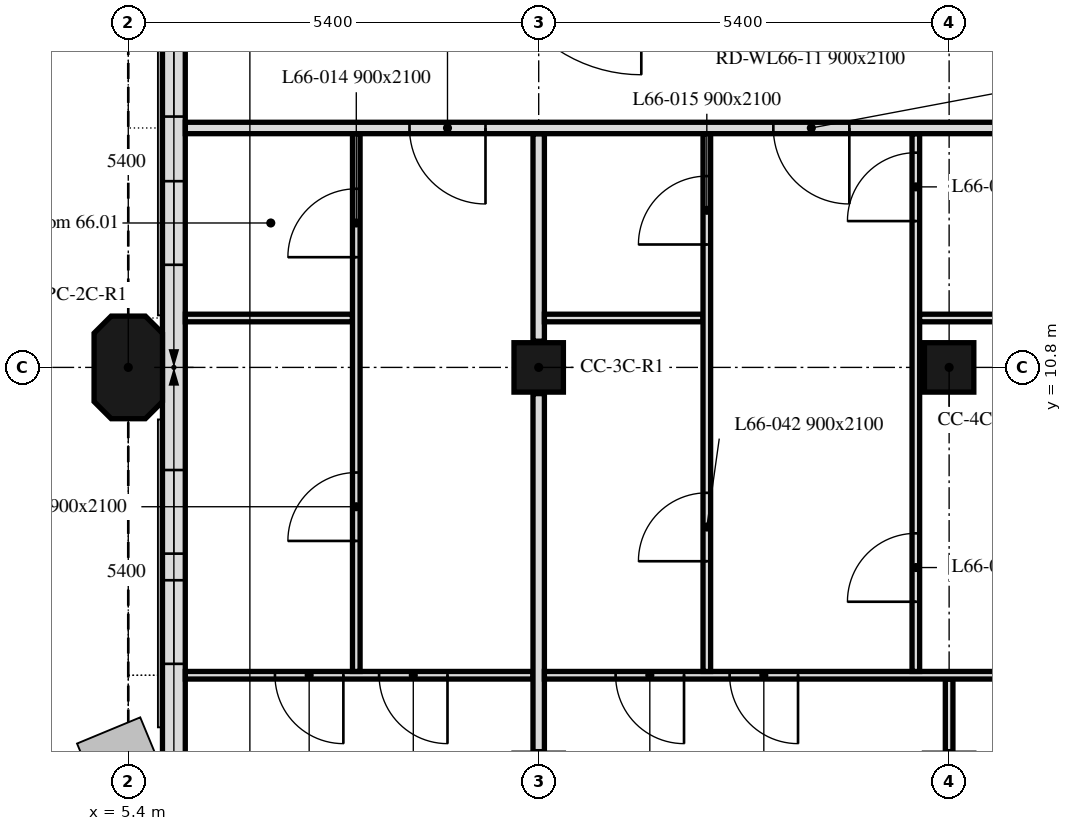
"""IFC4 building model, lengths in metres.
Left out: names, types, materials, properties, quantities, classifications, styles, units other than length and angle.
Written with IfcOpenShell. Run it as: python <this file> out.ifc"""

import sys

from ifc_helpers import new_model, si_unit, direction, frame, frame_2d, origin, origin_2d, place, context, subcontext, project, spatial, polyline, rectangle, outline, extrude, element, fill, save


model = new_model("IFC4")
c1 = context("Model", 3, precision=1e-05, world=origin(), true_north=direction((0.0, 1.0)))
c2 = subcontext(c1, "Body", "Model", "MODEL_VIEW")
j1 = project(units=[si_unit("LENGTHUNIT", "METRE"), si_unit("PLANEANGLEUNIT", "RADIAN")], contexts=[c1])
p1 = place(None, origin())
s1 = spatial("IfcSite", under=j1, at=p1, CompositionType="ELEMENT")
p2 = place(p1, origin())
s2 = spatial("IfcBuilding", under=s1, at=p2, CompositionType="ELEMENT")
p3 = place(p2, frame((0.0, 0.0, 271.9)))
s3 = spatial("IfcBuildingStorey", under=s2, at=p3, CompositionType="ELEMENT", Elevation=271.9)
p4 = place(p3, frame((5.4, 10.8, 0.0), z_axis=(0.0, 0.0, 1.0), x_axis=(0.0, 1.0, 0.0)))
e1 = element("IfcColumn", 1, at=p4, inside=s3, PredefinedType="COLUMN", context=c2, shape_type="SweptSolid", body=[
    extrude(outline(polyline([(-0.45, -0.45), (0.45, -0.45), (0.675, -0.225), (0.675, 0.225), (0.45, 0.45), (-0.45, 0.45), (-0.675, 0.225), (-0.675, -0.225), (-0.45, -0.45)])), origin(), (0.0, 0.0, 1.0), 3.0),
])
for number, where, z_axis, x_axis in (
    (2, (10.8, 10.8, 0.0), (0.0, 0.0, 1.0), (1.0, 0.0, 0.0)),
    (3, (16.2, 10.8, 0.0), (0.0, 0.0, 1.0), (1.0, 0.0, 0.0)),
):
    element("IfcColumn", number, at=place(p3, frame(where, z_axis=z_axis, x_axis=x_axis)), inside=s3, PredefinedType="COLUMN", context=c2, shape_type="SweptSolid", body=[
        extrude(rectangle(XDim=0.65, YDim=0.65, at=origin_2d()), origin(), (0.0, 0.0, 1.0), 3.0),
    ])
p5 = place(p3, frame((6.0, 16.2, 0.0), z_axis=(0.0, 0.0, 1.0), x_axis=(0.0, -1.0, 0.0)))
e4 = element("IfcWall", 4, at=p5, inside=s3, PredefinedType="SOLIDWALL", context=c2, shape_type="SweptSolid", body=[
    extrude(rectangle(XDim=10.614, YDim=0.3, at=frame_2d((5.307, 0.0))), origin(), (0.0, 0.0, 1.0), 3.0),
])
p6 = place(p5, frame((1.0, 0.0, 0.9)))
e5 = element("IfcOpeningElement", 5, at=p6, cuts=e4, PredefinedType="OPENING", context=c2, shape_type="SweptSolid", body=[
    extrude(rectangle(XDim=1.1, YDim=1.7, at=frame_2d((0.55, 0.85))), frame((0.0, 0.16, 0.0), z_axis=(0.0, -1.0, 0.0), x_axis=(1.0, 0.0, 0.0)), (0.0, 0.0, 1.0), 0.32),
])
p7 = place(p5, frame((2.95, 0.0, 0.9)))
e6 = element("IfcOpeningElement", 6, at=p7, cuts=e4, PredefinedType="OPENING", context=c2, shape_type="SweptSolid", body=[
    extrude(rectangle(XDim=1.1, YDim=1.7, at=frame_2d((0.55, 0.85))), frame((0.0, 0.16, 0.0), z_axis=(0.0, -1.0, 0.0), x_axis=(1.0, 0.0, 0.0)), (0.0, 0.0, 1.0), 0.32),
])
p8 = place(p5, frame((6.75, 0.0, 0.9)))
e7 = element("IfcOpeningElement", 7, at=p8, cuts=e4, PredefinedType="OPENING", context=c2, shape_type="SweptSolid", body=[
    extrude(rectangle(XDim=1.1, YDim=1.7, at=frame_2d((0.55, 0.85))), frame((0.0, 0.16, 0.0), z_axis=(0.0, -1.0, 0.0), x_axis=(1.0, 0.0, 0.0)), (0.0, 0.0, 1.0), 0.32),
])
p9 = place(p5, frame((8.2, 0.0, 0.9)))
e8 = element("IfcOpeningElement", 8, at=p9, cuts=e4, PredefinedType="OPENING", context=c2, shape_type="SweptSolid", body=[
    extrude(rectangle(XDim=1.1, YDim=1.7, at=frame_2d((0.55, 0.85))), frame((0.0, 0.16, 0.0), z_axis=(0.0, -1.0, 0.0), x_axis=(1.0, 0.0, 0.0)), (0.0, 0.0, 1.0), 0.32),
])
p10 = place(p3, frame((10.725, 6.75, 0.0), z_axis=(0.0, 0.0, 1.0), x_axis=(-1.0, 0.0, 0.0)))
e9 = element("IfcWall", 9, at=p10, inside=s3, PredefinedType="PARTITIONING", context=c2, shape_type="SweptSolid", body=[
    extrude(rectangle(XDim=4.574, YDim=0.1, at=frame_2d((2.287, 0.0))), origin(), (0.0, 0.0, 1.0), 3.0),
])
p11 = place(p10, frame((2.495, 0.0, 0.0)))
e10 = element("IfcOpeningElement", 10, at=p11, cuts=e9, PredefinedType="OPENING", context=c2, shape_type="SweptSolid", body=[
    extrude(rectangle(XDim=0.9, YDim=2.1, at=frame_2d((0.45, 1.05))), frame((0.0, 0.05, 0.0), z_axis=(0.0, -1.0, 0.0), x_axis=(1.0, 0.0, 0.0)), (0.0, 0.0, 1.0), 0.1),
])
p12 = place(p10, frame((1.125, 0.0, 0.0)))
e11 = element("IfcOpeningElement", 11, at=p12, cuts=e9, PredefinedType="OPENING", context=c2, shape_type="SweptSolid", body=[
    extrude(rectangle(XDim=0.9, YDim=2.1, at=frame_2d((0.45, 1.05))), frame((0.0, 0.05, 0.0), z_axis=(0.0, -1.0, 0.0), x_axis=(1.0, 0.0, 0.0)), (0.0, 0.0, 1.0), 0.1),
])
p13 = place(p3, frame((8.35, 11.45, 0.0), z_axis=(0.0, 0.0, 1.0), x_axis=(-1.0, 0.0, 0.0)))
e12 = element("IfcWall", 12, at=p13, inside=s3, PredefinedType="PARTITIONING", context=c2, shape_type="SweptSolid", body=[
    extrude(rectangle(XDim=2.199, YDim=0.1, at=frame_2d((1.1, 0.0))), origin(), (0.0, 0.0, 1.0), 3.0),
])
p14 = place(p3, frame((8.4, 6.8, 0.0), z_axis=(0.0, 0.0, 1.0), x_axis=(0.0, 1.0, 0.0)))
e13 = element("IfcWall", 13, at=p14, inside=s3, PredefinedType="PARTITIONING", context=c2, shape_type="SweptSolid", body=[
    extrude(rectangle(XDim=7.075, YDim=0.1, at=frame_2d((3.538, 0.0))), origin(), (0.0, 0.0, 1.0), 3.0),
])
p15 = place(p14, frame((5.45, 0.0, 0.0)))
e14 = element("IfcOpeningElement", 14, at=p15, cuts=e13, PredefinedType="OPENING", context=c2, shape_type="SweptSolid", body=[
    extrude(rectangle(XDim=0.9, YDim=2.1, at=frame_2d((0.45, 1.05))), frame((0.0, 0.05, 0.0), z_axis=(0.0, -1.0, 0.0), x_axis=(1.0, 0.0, 0.0)), (0.0, 0.0, 1.0), 0.1),
])
p16 = place(p14, frame((1.717, 0.0, 0.0)))
e15 = element("IfcOpeningElement", 15, at=p16, cuts=e13, PredefinedType="OPENING", context=c2, shape_type="SweptSolid", body=[
    extrude(rectangle(XDim=0.9, YDim=2.1, at=frame_2d((0.45, 1.05))), frame((0.0, 0.05, 0.0), z_axis=(0.0, -1.0, 0.0), x_axis=(1.0, 0.0, 0.0)), (0.0, 0.0, 1.0), 0.1),
])
p17 = place(p3, frame((10.8, 5.745, 0.0), z_axis=(0.0, 0.0, 1.0), x_axis=(0.0, 1.0, 0.0)))
e16 = element("IfcWall", 16, at=p17, inside=s3, PredefinedType="PARTITIONING", context=c2, shape_type="SweptSolid", body=[
    extrude(rectangle(XDim=4.71, YDim=0.15, at=frame_2d((2.355, 0.0))), origin(), (0.0, 0.0, 1.0), 3.0),
])
p18 = place(p3, frame((10.8, 11.145, 0.0), z_axis=(0.0, 0.0, 1.0), x_axis=(0.0, 1.0, 0.0)))
e17 = element("IfcWall", 17, at=p18, inside=s3, PredefinedType="PARTITIONING", context=c2, shape_type="SweptSolid", body=[
    extrude(rectangle(XDim=2.73, YDim=0.15, at=frame_2d((1.365, 0.0))), origin(), (0.0, 0.0, 1.0), 3.0),
])
p19 = place(p3, frame((16.2, 5.745, 0.0), z_axis=(0.0, 0.0, 1.0), x_axis=(0.0, 1.0, 0.0)))
e18 = element("IfcWall", 18, at=p19, inside=s3, PredefinedType="PARTITIONING", context=c2, shape_type="SweptSolid", body=[
    extrude(rectangle(XDim=0.955, YDim=0.1, at=frame_2d((0.478, 0.0))), origin(), (0.0, 0.0, 1.0), 2.4),
])
p20 = place(p3, frame((21.525, 6.75, 0.0), z_axis=(0.0, 0.0, 1.0), x_axis=(-1.0, 0.0, 0.0)))
e19 = element("IfcWall", 19, at=p20, inside=s3, PredefinedType="PARTITIONING", context=c2, shape_type="SweptSolid", body=[
    extrude(rectangle(XDim=10.65, YDim=0.1, at=frame_2d((5.325, 0.0))), origin(), (0.0, 0.0, 1.0), 2.4),
])
p21 = place(p20, frame((8.813, 0.0, 0.0)))
e20 = element("IfcOpeningElement", 20, at=p21, cuts=e19, PredefinedType="OPENING", context=c2, shape_type="SweptSolid", body=[
    extrude(rectangle(XDim=0.9, YDim=2.1, at=frame_2d((0.45, 1.05))), frame((0.0, 0.05, 0.0), z_axis=(0.0, -1.0, 0.0), x_axis=(1.0, 0.0, 0.0)), (0.0, 0.0, 1.0), 0.1),
])
p22 = place(p20, frame((1.675, 0.0, 0.0)))
e21 = element("IfcOpeningElement", 21, at=p22, cuts=e19, PredefinedType="OPENING", context=c2, shape_type="SweptSolid", body=[
    extrude(rectangle(XDim=0.9, YDim=2.1, at=frame_2d((0.45, 1.05))), frame((0.0, 0.05, 0.0), z_axis=(0.0, -1.0, 0.0), x_axis=(1.0, 0.0, 0.0)), (0.0, 0.0, 1.0), 0.1),
])
p23 = place(p20, frame((7.313, 0.0, 0.0)))
e22 = element("IfcOpeningElement", 22, at=p23, cuts=e19, PredefinedType="OPENING", context=c2, shape_type="SweptSolid", body=[
    extrude(rectangle(XDim=0.9, YDim=2.1, at=frame_2d((0.45, 1.05))), frame((0.0, 0.05, 0.0), z_axis=(0.0, -1.0, 0.0), x_axis=(1.0, 0.0, 0.0)), (0.0, 0.0, 1.0), 0.1),
])
p24 = place(p3, frame((12.962, 11.45, 0.0), z_axis=(0.0, 0.0, 1.0), x_axis=(-1.0, 0.0, 0.0)))
e23 = element("IfcWall", 23, at=p24, inside=s3, PredefinedType="PARTITIONING", context=c2, shape_type="SweptSolid", body=[
    extrude(rectangle(XDim=2.087, YDim=0.1, at=frame_2d((1.043, 0.0))), origin(), (0.0, 0.0, 1.0), 3.0),
])
p25 = place(p3, frame((13.012, 6.8, 0.0), z_axis=(0.0, 0.0, 1.0), x_axis=(0.0, 1.0, 0.0)))
e24 = element("IfcWall", 24, at=p25, inside=s3, PredefinedType="PARTITIONING", context=c2, shape_type="SweptSolid", body=[
    extrude(rectangle(XDim=7.075, YDim=0.1, at=frame_2d((3.538, 0.0))), origin(), (0.0, 0.0, 1.0), 3.0),
])
p26 = place(p25, frame((5.617, 0.0, 0.0)))
e25 = element("IfcOpeningElement", 25, at=p26, cuts=e24, PredefinedType="OPENING", context=c2, shape_type="SweptSolid", body=[
    extrude(rectangle(XDim=0.9, YDim=2.1, at=frame_2d((0.45, 1.05))), frame((0.0, 0.05, 0.0), z_axis=(0.0, -1.0, 0.0), x_axis=(1.0, 0.0, 0.0)), (0.0, 0.0, 1.0), 0.1),
])
p27 = place(p25, frame((1.45, 0.0, 0.0)))
e26 = element("IfcOpeningElement", 26, at=p27, cuts=e24, PredefinedType="OPENING", context=c2, shape_type="SweptSolid", body=[
    extrude(rectangle(XDim=0.9, YDim=2.1, at=frame_2d((0.45, 1.05))), frame((0.0, 0.05, 0.0), z_axis=(0.0, -1.0, 0.0), x_axis=(1.0, 0.0, 0.0)), (0.0, 0.0, 1.0), 0.1),
])
p28 = place(p3, frame((15.762, 6.8, 0.0), z_axis=(0.0, 0.0, 1.0), x_axis=(0.0, 1.0, 0.0)))
e27 = element("IfcWall", 27, at=p28, inside=s3, PredefinedType="PARTITIONING", context=c2, shape_type="SweptSolid", body=[
    extrude(rectangle(XDim=7.075, YDim=0.1, at=frame_2d((3.538, 0.0))), origin(), (0.0, 0.0, 1.0), 3.0),
])
p29 = place(p28, frame((0.917, 0.0, 0.0)))
e28 = element("IfcOpeningElement", 28, at=p29, cuts=e27, PredefinedType="OPENING", context=c2, shape_type="SweptSolid", body=[
    extrude(rectangle(XDim=0.9, YDim=2.1, at=frame_2d((0.45, 1.05))), frame((0.0, 0.05, 0.0), z_axis=(0.0, -1.0, 0.0), x_axis=(1.0, 0.0, 0.0)), (0.0, 0.0, 1.0), 0.1),
])
p30 = place(p28, frame((5.925, 0.0, 0.0)))
e29 = element("IfcOpeningElement", 29, at=p30, cuts=e27, PredefinedType="OPENING", context=c2, shape_type="SweptSolid", body=[
    extrude(rectangle(XDim=0.9, YDim=2.1, at=frame_2d((0.45, 1.05))), frame((0.0, 0.05, 0.0), z_axis=(0.0, -1.0, 0.0), x_axis=(1.0, 0.0, 0.0)), (0.0, 0.0, 1.0), 0.1),
])
p31 = place(p3, frame((18.6, 11.45, 0.0), z_axis=(0.0, 0.0, 1.0), x_axis=(-1.0, 0.0, 0.0)))
e30 = element("IfcWall", 30, at=p31, inside=s3, PredefinedType="PARTITIONING", context=c2, shape_type="SweptSolid", body=[
    extrude(rectangle(XDim=2.788, YDim=0.1, at=frame_2d((1.394, 0.0))), origin(), (0.0, 0.0, 1.0), 2.4),
])
p32 = place(p3, frame((47.849, 13.95, 0.0), z_axis=(0.0, 0.0, 1.0), x_axis=(-1.0, 0.0, 0.0)))
e31 = element("IfcWall", 31, at=p32, inside=s3, PredefinedType="PARTITIONING", context=c2, shape_type="SweptSolid", body=[
    extrude(rectangle(XDim=41.698, YDim=0.15, at=frame_2d((20.849, 0.0))), origin(), (0.0, 0.0, 1.0), 2.4),
])
p33 = place(p32, frame((37.749, 0.0, 0.0)))
e32 = element("IfcOpeningElement", 32, at=p33, cuts=e31, PredefinedType="OPENING", context=c2, shape_type="SweptSolid", body=[
    extrude(rectangle(XDim=1.0, YDim=2.1, at=frame_2d((0.5, 1.05))), frame((0.0, 0.075, 0.0), z_axis=(0.0, -1.0, 0.0), x_axis=(1.0, 0.0, 0.0)), (0.0, 0.0, 1.0), 0.15),
])
p34 = place(p32, frame((32.962, 0.0, 0.0)))
e33 = element("IfcOpeningElement", 33, at=p34, cuts=e31, PredefinedType="OPENING", context=c2, shape_type="SweptSolid", body=[
    extrude(rectangle(XDim=1.0, YDim=2.1, at=frame_2d((0.5, 1.05))), frame((0.0, 0.075, 0.0), z_axis=(0.0, -1.0, 0.0), x_axis=(1.0, 0.0, 0.0)), (0.0, 0.0, 1.0), 0.15),
])
p35 = place(p32, frame((22.179, 0.0, 0.0)))
e34 = element("IfcOpeningElement", 34, at=p35, cuts=e31, PredefinedType="OPENING", context=c2, shape_type="SweptSolid", body=[
    extrude(rectangle(XDim=1.0, YDim=2.1, at=frame_2d((0.5, 1.05))), frame((0.0, 0.075, 0.0), z_axis=(0.0, -1.0, 0.0), x_axis=(1.0, 0.0, 0.0)), (0.0, 0.0, 1.0), 0.15),
])
p36 = place(p32, frame((9.193, 0.0, 0.0)))
e35 = element("IfcOpeningElement", 35, at=p36, cuts=e31, PredefinedType="OPENING", context=c2, shape_type="SweptSolid", body=[
    extrude(rectangle(XDim=1.0, YDim=2.1, at=frame_2d((0.5, 1.05))), frame((0.0, 0.075, 0.0), z_axis=(0.0, -1.0, 0.0), x_axis=(1.0, 0.0, 0.0)), (0.0, 0.0, 1.0), 0.15),
])
p37 = place(p6, origin())
e36 = element("IfcWindow", 36, at=p37, inside=s3, PartitioningType="SINGLE_PANEL", PredefinedType="WINDOW", context=c2, shape_type="SweptSolid", body=[
    extrude(rectangle(XDim=1.1, YDim=1.7, at=frame_2d((0.55, 0.85))), frame((0.0, 0.03, 0.0), z_axis=(0.0, -1.0, 0.0), x_axis=(1.0, 0.0, 0.0)), (0.0, 0.0, 1.0), 0.06),
])
fill(e5, e36)
p38 = place(p7, origin())
e37 = element("IfcWindow", 37, at=p38, inside=s3, PartitioningType="SINGLE_PANEL", PredefinedType="WINDOW", context=c2, shape_type="SweptSolid", body=[
    extrude(rectangle(XDim=1.1, YDim=1.7, at=frame_2d((0.55, 0.85))), frame((0.0, 0.03, 0.0), z_axis=(0.0, -1.0, 0.0), x_axis=(1.0, 0.0, 0.0)), (0.0, 0.0, 1.0), 0.06),
])
fill(e6, e37)
p39 = place(p8, origin())
e38 = element("IfcWindow", 38, at=p39, inside=s3, PartitioningType="SINGLE_PANEL", PredefinedType="WINDOW", context=c2, shape_type="SweptSolid", body=[
    extrude(rectangle(XDim=1.1, YDim=1.7, at=frame_2d((0.55, 0.85))), frame((0.0, 0.03, 0.0), z_axis=(0.0, -1.0, 0.0), x_axis=(1.0, 0.0, 0.0)), (0.0, 0.0, 1.0), 0.06),
])
fill(e7, e38)
p40 = place(p9, origin())
e39 = element("IfcWindow", 39, at=p40, inside=s3, PartitioningType="SINGLE_PANEL", PredefinedType="WINDOW", context=c2, shape_type="SweptSolid", body=[
    extrude(rectangle(XDim=1.1, YDim=1.7, at=frame_2d((0.55, 0.85))), frame((0.0, 0.03, 0.0), z_axis=(0.0, -1.0, 0.0), x_axis=(1.0, 0.0, 0.0)), (0.0, 0.0, 1.0), 0.06),
])
fill(e8, e39)
p41 = place(p15, origin())
e40 = element("IfcDoor", 40, at=p41, inside=s3, OperationType="SINGLE_SWING_RIGHT", PredefinedType="DOOR", context=c2, shape_type="SweptSolid", body=[
    extrude(rectangle(XDim=0.9, YDim=2.1, at=frame_2d((0.45, 1.05))), frame((0.0, 0.025, 0.0), z_axis=(0.0, -1.0, 0.0), x_axis=(1.0, 0.0, 0.0)), (0.0, 0.0, 1.0), 0.05),
])
fill(e14, e40)
p42 = place(p26, origin())
e41 = element("IfcDoor", 41, at=p42, inside=s3, OperationType="SINGLE_SWING_LEFT", PredefinedType="DOOR", context=c2, shape_type="SweptSolid", body=[
    extrude(rectangle(XDim=0.9, YDim=2.1, at=frame_2d((0.45, 1.05))), frame((0.0, 0.025, 0.0), z_axis=(0.0, -1.0, 0.0), x_axis=(1.0, 0.0, 0.0)), (0.0, 0.0, 1.0), 0.05),
])
fill(e25, e41)
p43 = place(p29, origin())
e42 = element("IfcDoor", 42, at=p43, inside=s3, OperationType="SINGLE_SWING_RIGHT", PredefinedType="DOOR", context=c2, shape_type="SweptSolid", body=[
    extrude(rectangle(XDim=0.9, YDim=2.1, at=frame_2d((0.45, 1.05))), frame((0.0, 0.025, 0.0), z_axis=(0.0, -1.0, 0.0), x_axis=(1.0, 0.0, 0.0)), (0.0, 0.0, 1.0), 0.05),
])
fill(e28, e42)
p44 = place(p30, origin())
e43 = element("IfcDoor", 43, at=p44, inside=s3, OperationType="SINGLE_SWING_RIGHT", PredefinedType="DOOR", context=c2, shape_type="SweptSolid", body=[
    extrude(rectangle(XDim=0.9, YDim=2.1, at=frame_2d((0.45, 1.05))), frame((0.0, 0.025, 0.0), z_axis=(0.0, -1.0, 0.0), x_axis=(1.0, 0.0, 0.0)), (0.0, 0.0, 1.0), 0.05),
])
fill(e29, e43)
p45 = place(p11, origin())
e44 = element("IfcDoor", 44, at=p45, inside=s3, OperationType="SINGLE_SWING_RIGHT", PredefinedType="DOOR", context=c2, shape_type="SweptSolid", body=[
    extrude(rectangle(XDim=0.9, YDim=2.1, at=frame_2d((0.45, 1.05))), frame((0.0, 0.025, 0.0), z_axis=(0.0, -1.0, 0.0), x_axis=(1.0, 0.0, 0.0)), (0.0, 0.0, 1.0), 0.05),
])
fill(e10, e44)
p46 = place(p12, origin())
e45 = element("IfcDoor", 45, at=p46, inside=s3, OperationType="SINGLE_SWING_LEFT", PredefinedType="DOOR", context=c2, shape_type="SweptSolid", body=[
    extrude(rectangle(XDim=0.9, YDim=2.1, at=frame_2d((0.45, 1.05))), frame((0.0, 0.025, 0.0), z_axis=(0.0, -1.0, 0.0), x_axis=(1.0, 0.0, 0.0)), (0.0, 0.0, 1.0), 0.05),
])
fill(e11, e45)
p47 = place(p16, origin())
e46 = element("IfcDoor", 46, at=p47, inside=s3, OperationType="SINGLE_SWING_LEFT", PredefinedType="DOOR", context=c2, shape_type="SweptSolid", body=[
    extrude(rectangle(XDim=0.9, YDim=2.1, at=frame_2d((0.45, 1.05))), frame((0.0, 0.025, 0.0), z_axis=(0.0, -1.0, 0.0), x_axis=(1.0, 0.0, 0.0)), (0.0, 0.0, 1.0), 0.05),
])
fill(e15, e46)
p48 = place(p21, origin())
e47 = element("IfcDoor", 47, at=p48, inside=s3, OperationType="SINGLE_SWING_RIGHT", PredefinedType="DOOR", context=c2, shape_type="SweptSolid", body=[
    extrude(rectangle(XDim=0.9, YDim=2.1, at=frame_2d((0.45, 1.05))), frame((0.0, 0.025, 0.0), z_axis=(0.0, -1.0, 0.0), x_axis=(1.0, 0.0, 0.0)), (0.0, 0.0, 1.0), 0.05),
])
fill(e20, e47)
p49 = place(p27, origin())
e48 = element("IfcDoor", 48, at=p49, inside=s3, OperationType="SINGLE_SWING_RIGHT", PredefinedType="DOOR", context=c2, shape_type="SweptSolid", body=[
    extrude(rectangle(XDim=0.9, YDim=2.1, at=frame_2d((0.45, 1.05))), frame((0.0, 0.025, 0.0), z_axis=(0.0, -1.0, 0.0), x_axis=(1.0, 0.0, 0.0)), (0.0, 0.0, 1.0), 0.05),
])
fill(e26, e48)
p50 = place(p23, origin())
e49 = element("IfcDoor", 49, at=p50, inside=s3, OperationType="SINGLE_SWING_LEFT", PredefinedType="DOOR", context=c2, shape_type="SweptSolid", body=[
    extrude(rectangle(XDim=0.9, YDim=2.1, at=frame_2d((0.45, 1.05))), frame((0.0, 0.025, 0.0), z_axis=(0.0, -1.0, 0.0), x_axis=(1.0, 0.0, 0.0)), (0.0, 0.0, 1.0), 0.05),
])
fill(e22, e49)
p51 = place(p33, origin())
e50 = element("IfcDoor", 50, at=p51, inside=s3, OperationType="SINGLE_SWING_LEFT", PredefinedType="DOOR", context=c2, shape_type="SweptSolid", body=[
    extrude(rectangle(XDim=1.0, YDim=2.1, at=frame_2d((0.5, 1.05))), frame((0.0, 0.025, 0.0), z_axis=(0.0, -1.0, 0.0), x_axis=(1.0, 0.0, 0.0)), (0.0, 0.0, 1.0), 0.05),
])
fill(e32, e50)
p52 = place(p34, origin())
e51 = element("IfcDoor", 51, at=p52, inside=s3, OperationType="SINGLE_SWING_LEFT", PredefinedType="DOOR", context=c2, shape_type="SweptSolid", body=[
    extrude(rectangle(XDim=1.0, YDim=2.1, at=frame_2d((0.5, 1.05))), frame((0.0, 0.025, 0.0), z_axis=(0.0, -1.0, 0.0), x_axis=(1.0, 0.0, 0.0)), (0.0, 0.0, 1.0), 0.05),
])
fill(e33, e51)
save(model, sys.argv[1])
